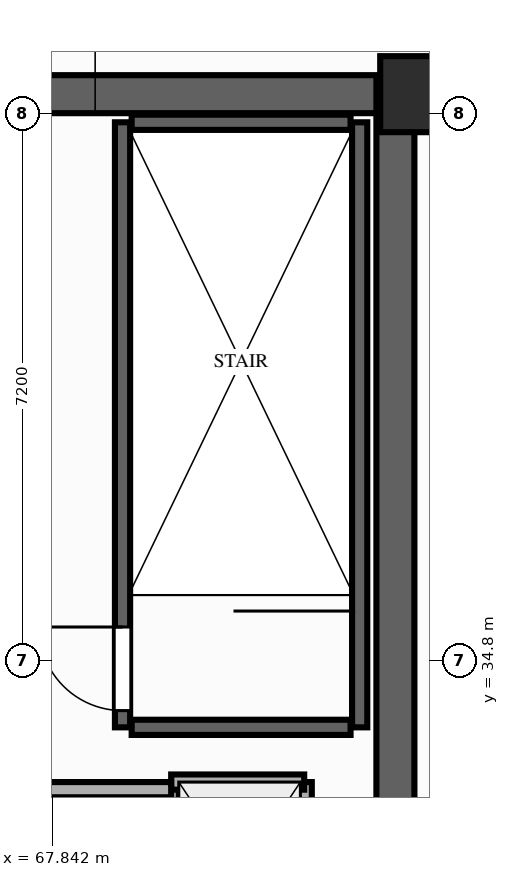
"""IFC4 building model, lengths in metres.
Left out: names, types, materials, properties, quantities, classifications, styles, units other than length and angle.
Written with IfcOpenShell. Run it as: python <this file> out.ifc"""

import sys

from ifc_helpers import new_model, si_unit, direction, frame, frame_2d, origin, origin_2d, place, context, subcontext, project, spatial, rectangle, extrude, element, fill, save


model = new_model("IFC4")
c1 = context("Model", 3, precision=1e-05, world=origin(), true_north=direction((0.0, 1.0)))
c2 = subcontext(c1, "Body", "Model", "MODEL_VIEW")
j1 = project(units=[si_unit("LENGTHUNIT", "METRE"), si_unit("PLANEANGLEUNIT", "RADIAN")], contexts=[c1])
p1 = place(None, origin())
s1 = spatial("IfcSite", under=j1, at=p1, CompositionType="ELEMENT")
p2 = place(p1, origin())
s2 = spatial("IfcBuilding", under=s1, at=p2, CompositionType="ELEMENT")
p3 = place(p2, frame((0.0, 0.0, 102.6)))
s3 = spatial("IfcBuildingStorey", under=s2, at=p3, CompositionType="ELEMENT", Elevation=102.6)
p4 = place(p3, frame((72.65, 42.25, 0.0), z_axis=(0.0, 0.0, 1.0), x_axis=(1.0, 0.0, 0.0)))
e1 = element("IfcColumn", 1, at=p4, inside=s3, PredefinedType="COLUMN", context=c2, shape_type="SweptSolid", body=[
    extrude(rectangle(XDim=1.0, YDim=1.0, at=origin_2d()), origin(), (0.0, 0.0, 1.0), 4.8),
])
p5 = place(p3, frame((72.35, 22.0, 0.0), z_axis=(0.0, 0.0, 1.0), x_axis=(0.0, 1.0, 0.0)))
e2 = element("IfcWall", 2, at=p5, inside=s3, PredefinedType="SHEAR", context=c2, shape_type="SweptSolid", body=[
    extrude(rectangle(XDim=20.25, YDim=0.5, at=frame_2d((10.125, 0.0))), origin(), (0.0, 0.0, 1.0), 4.56),
])
p6 = place(p3, frame((64.6, 42.25, 0.0), z_axis=(0.0, 0.0, 1.0), x_axis=(1.0, 0.0, 0.0)))
e3 = element("IfcWall", 3, at=p6, inside=s3, PredefinedType="SHEAR", context=c2, shape_type="SweptSolid", body=[
    extrude(rectangle(XDim=7.5, YDim=0.5, at=frame_2d((3.75, 0.0))), origin(), (0.0, 0.0, 1.0), 4.56),
])
p7 = place(p3, frame((68.76, 33.92, 0.0), z_axis=(0.0, 0.0, 1.0), x_axis=(0.0, 1.0, 0.0)))
e4 = element("IfcWall", 4, at=p7, inside=s3, PredefinedType="SHEAR", context=c2, shape_type="SweptSolid", body=[
    extrude(rectangle(XDim=7.96, YDim=0.2, at=frame_2d((3.98, 0.0))), origin(), (0.0, 0.0, 1.0), 4.56),
])
p8 = place(p7, frame((0.22, 0.0, 0.0)))
e5 = element("IfcOpeningElement", 5, at=p8, cuts=e4, PredefinedType="OPENING", context=c2, shape_type="SweptSolid", body=[
    extrude(rectangle(XDim=1.1, YDim=2.15, at=frame_2d((0.55, 1.075))), frame((0.0, 0.11, 0.0), z_axis=(0.0, -1.0, 0.0), x_axis=(1.0, 0.0, 0.0)), (0.0, 0.0, 1.0), 0.22),
])
p9 = place(p3, frame((71.88, 33.92, 0.0), z_axis=(0.0, 0.0, 1.0), x_axis=(0.0, 1.0, 0.0)))
e6 = element("IfcWall", 6, at=p9, inside=s3, PredefinedType="SHEAR", context=c2, shape_type="SweptSolid", body=[
    extrude(rectangle(XDim=7.96, YDim=0.2, at=frame_2d((3.98, 0.0))), origin(), (0.0, 0.0, 1.0), 4.56),
])
for number, where, z_axis, x_axis in (
    (7, (68.88, 41.88, 0.0), (0.0, 0.0, 1.0), (1.0, 0.0, 0.0)),
    (8, (68.88, 33.92, 0.0), (0.0, 0.0, 1.0), (1.0, 0.0, 0.0)),
):
    element("IfcWall", number, at=place(p3, frame(where, z_axis=z_axis, x_axis=x_axis)), inside=s3, PredefinedType="SHEAR", context=c2, shape_type="SweptSolid", body=[
        extrude(rectangle(XDim=2.88, YDim=0.2, at=frame_2d((1.44, 0.0))), origin(), (0.0, 0.0, 1.0), 4.56),
    ])
p10 = place(p3, frame((69.4, 30.75, 0.0), z_axis=(0.0, 0.0, 1.0), x_axis=(0.0, 1.0, 0.0)))
e9 = element("IfcWall", 9, at=p10, inside=s3, PredefinedType="MOVABLE", context=c2, shape_type="SweptSolid", body=[
    extrude(rectangle(XDim=2.45, YDim=0.2, at=frame_2d((1.225, 0.0))), origin(), (0.0, 0.0, 1.0), 4.56),
])
p11 = place(p10, frame((0.65, 0.0, 0.0)))
e10 = element("IfcOpeningElement", 10, at=p11, cuts=e9, PredefinedType="OPENING", context=c2, shape_type="SweptSolid", body=[
    extrude(rectangle(XDim=1.05, YDim=2.15, at=frame_2d((0.525, 1.075))), frame((0.0, 0.11, 0.0), z_axis=(0.0, -1.0, 0.0), x_axis=(1.0, 0.0, 0.0)), (0.0, 0.0, 1.0), 0.22),
])
p12 = place(p3, frame((71.15, 30.75, 0.0), z_axis=(0.0, 0.0, 1.0), x_axis=(0.0, 1.0, 0.0)))
e11 = element("IfcWall", 11, at=p12, inside=s3, PredefinedType="MOVABLE", context=c2, shape_type="SweptSolid", body=[
    extrude(rectangle(XDim=2.45, YDim=0.2, at=frame_2d((1.225, 0.0))), origin(), (0.0, 0.0, 1.0), 4.56),
])
p13 = place(p3, frame((69.4, 33.2, 0.0), z_axis=(0.0, 0.0, 1.0), x_axis=(1.0, 0.0, 0.0)))
e12 = element("IfcWall", 12, at=p13, inside=s3, PredefinedType="MOVABLE", context=c2, shape_type="SweptSolid", body=[
    extrude(rectangle(XDim=1.75, YDim=0.2, at=frame_2d((0.875, 0.0))), origin(), (0.0, 0.0, 1.0), 4.56),
])
p14 = place(p3, frame((65.8, 33.1, 0.0), z_axis=(0.0, 0.0, 1.0), x_axis=(1.0, 0.0, 0.0)))
e13 = element("IfcWall", 13, at=p14, inside=s3, PredefinedType="PARTITIONING", context=c2, shape_type="SweptSolid", body=[
    extrude(rectangle(XDim=3.6, YDim=0.2, at=frame_2d((1.8, 0.0))), origin(), (0.0, 0.0, 1.0), 4.56),
])
p15 = place(p8, origin())
e14 = element("IfcDoor", 14, at=p15, inside=s3, OperationType="SINGLE_SWING_RIGHT", PredefinedType="DOOR", context=c2, shape_type="SweptSolid", body=[
    extrude(rectangle(XDim=1.1, YDim=2.15, at=frame_2d((0.55, 1.075))), frame((0.0, 0.025, 0.0), z_axis=(0.0, -1.0, 0.0), x_axis=(1.0, 0.0, 0.0)), (0.0, 0.0, 1.0), 0.05),
])
fill(e5, e14)
save(model, sys.argv[1])
